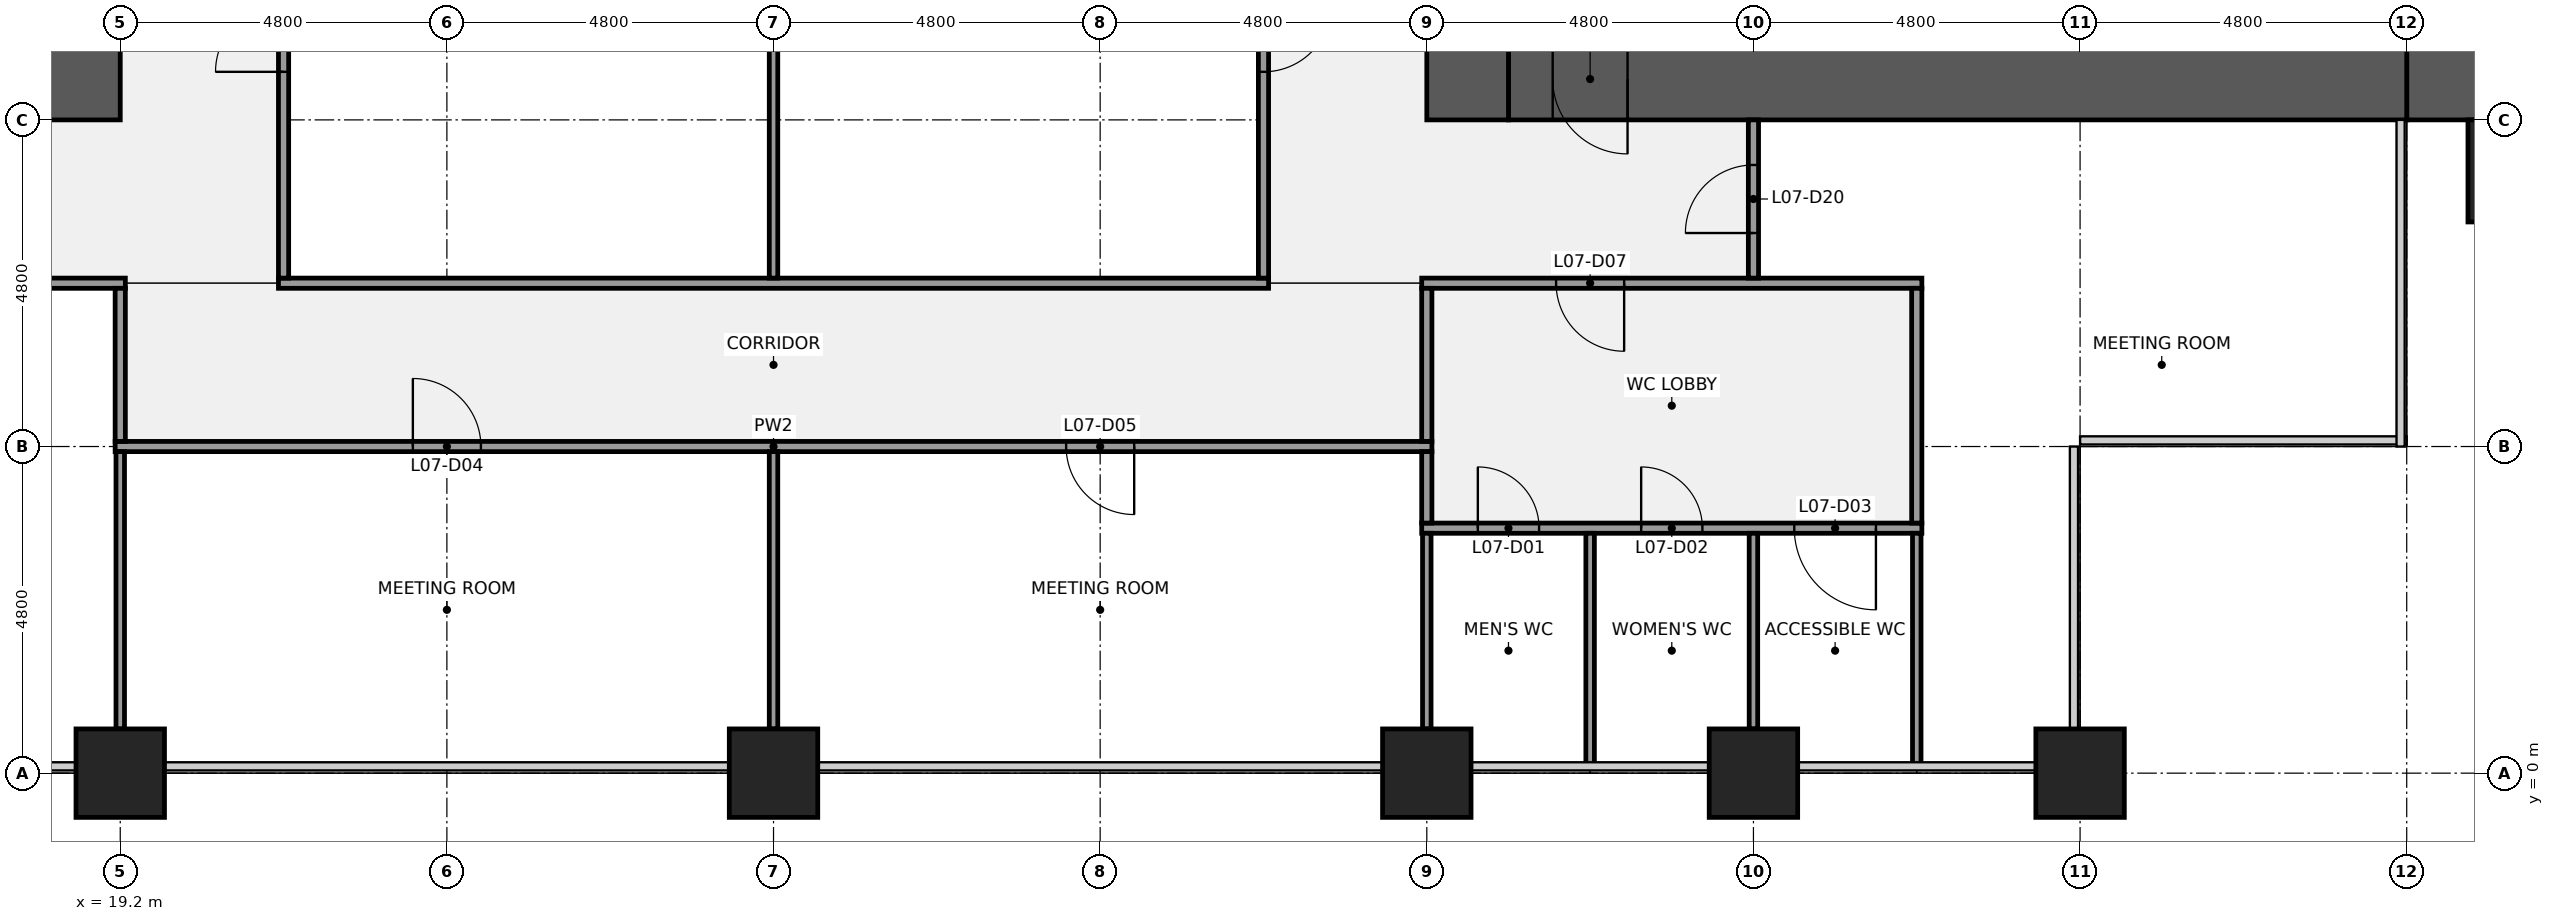
"""IFC4 building model, lengths in metres.
Left out: names, types, materials, properties, quantities, classifications, styles, units other than length and angle.
Written with IfcOpenShell. Run it as: python <this file> out.ifc"""

import sys

from ifc_helpers import new_model, si_unit, direction, frame, frame_2d, origin, origin_2d, place, context, subcontext, project, spatial, rectangle, extrude, element, fill, save


model = new_model("IFC4")
c1 = context("Model", 3, precision=1e-05, world=origin(), true_north=direction((0.0, 1.0)))
c2 = subcontext(c1, "Body", "Model", "MODEL_VIEW")
j1 = project(units=[si_unit("LENGTHUNIT", "METRE"), si_unit("PLANEANGLEUNIT", "RADIAN")], contexts=[c1])
p1 = place(None, origin())
s1 = spatial("IfcSite", under=j1, at=p1, CompositionType="ELEMENT")
p2 = place(p1, origin())
s2 = spatial("IfcBuilding", under=s1, at=p2, CompositionType="ELEMENT")
p3 = place(p2, frame((0.0, 0.0, 39.0)))
s3 = spatial("IfcBuildingStorey", under=s2, at=p3, CompositionType="ELEMENT", Elevation=39.0)
for number, where, z_axis, x_axis in (
    (1, (19.2, 0.0, 0.0), (0.0, 0.0, 1.0), (1.0, 0.0, 0.0)),
    (2, (28.8, 0.0, 0.0), (0.0, 0.0, 1.0), (1.0, 0.0, 0.0)),
    (3, (38.4, 0.0, 0.0), (0.0, 0.0, 1.0), (1.0, 0.0, 0.0)),
    (4, (43.2, 0.0, 0.0), (0.0, 0.0, 1.0), (1.0, 0.0, 0.0)),
    (5, (48.0, 0.0, 0.0), (0.0, 0.0, 1.0), (1.0, 0.0, 0.0)),
):
    element("IfcColumn", number, at=place(p3, frame(where, z_axis=z_axis, x_axis=x_axis)), inside=s3, PredefinedType="COLUMN", context=c2, shape_type="SweptSolid", body=[
        extrude(rectangle(XDim=1.3, YDim=1.3, at=origin_2d()), origin(), (0.0, 0.0, 1.0), 4.0),
    ])
p4 = place(p3, frame((18.6, 38.4, 0.0), z_axis=(0.0, 0.0, 1.0), x_axis=(0.0, -1.0, 0.0)))
e6 = element("IfcWall", 6, at=p4, inside=s3, PredefinedType="SHEAR", context=c2, shape_type="SweptSolid", body=[
    extrude(rectangle(XDim=28.8, YDim=1.2, at=frame_2d((14.4, 0.0))), origin(), (0.0, 0.0, 1.0), 3.84),
])
p5 = place(p4, frame((18.3, 0.0, 0.0)))
e7 = element("IfcOpeningElement", 7, at=p5, cuts=e6, PredefinedType="OPENING", context=c2, shape_type="SweptSolid", body=[
    extrude(rectangle(XDim=1.8, YDim=2.1, at=frame_2d((0.9, 1.05))), frame((0.0, 0.61, 0.0), z_axis=(0.0, -1.0, 0.0), x_axis=(1.0, 0.0, 0.0)), (0.0, 0.0, 1.0), 1.22),
])
p6 = place(p4, frame((8.7, 0.0, 0.0)))
e8 = element("IfcOpeningElement", 8, at=p6, cuts=e6, PredefinedType="OPENING", context=c2, shape_type="SweptSolid", body=[
    extrude(rectangle(XDim=1.8, YDim=2.1, at=frame_2d((0.9, 1.05))), frame((0.0, 0.61, 0.0), z_axis=(0.0, -1.0, 0.0), x_axis=(1.0, 0.0, 0.0)), (0.0, 0.0, 1.0), 1.22),
])
p7 = place(p3, frame((56.4, 10.2, 0.0), z_axis=(0.0, 0.0, 1.0), x_axis=(-1.0, 0.0, 0.0)))
e9 = element("IfcWall", 9, at=p7, inside=s3, PredefinedType="SHEAR", context=c2, shape_type="SweptSolid", body=[
    extrude(rectangle(XDim=3.6, YDim=1.2, at=frame_2d((1.8, 0.0))), origin(), (0.0, 0.0, 1.0), 3.84),
])
p8 = place(p3, frame((52.8, 10.2, 0.0), z_axis=(0.0, 0.0, 1.0), x_axis=(-1.0, 0.0, 0.0)))
e10 = element("IfcWall", 10, at=p8, inside=s3, PredefinedType="SHEAR", context=c2, shape_type="SweptSolid", body=[
    extrude(rectangle(XDim=13.2, YDim=1.2, at=frame_2d((6.6, 0.0))), origin(), (0.0, 0.0, 1.0), 3.84),
])
p9 = place(p8, frame((11.45, 0.0, 0.0)))
e11 = element("IfcOpeningElement", 11, at=p9, cuts=e10, PredefinedType="OPENING", context=c2, shape_type="SweptSolid", body=[
    extrude(rectangle(XDim=1.1, YDim=2.1, at=frame_2d((0.55, 1.05))), frame((0.0, 0.61, 0.0), z_axis=(0.0, -1.0, 0.0), x_axis=(1.0, 0.0, 0.0)), (0.0, 0.0, 1.0), 1.22),
])
p10 = place(p3, frame((39.0, 9.6, 0.0), z_axis=(0.0, 0.0, 1.0), x_axis=(0.0, 1.0, 0.0)))
e12 = element("IfcWall", 12, at=p10, inside=s3, PredefinedType="SHEAR", context=c2, shape_type="SweptSolid", body=[
    extrude(rectangle(XDim=28.8, YDim=1.2, at=frame_2d((14.4, 0.0))), origin(), (0.0, 0.0, 1.0), 3.84),
])
p11 = place(p10, frame((8.7, 0.0, 0.0)))
e13 = element("IfcOpeningElement", 13, at=p11, cuts=e12, PredefinedType="OPENING", context=c2, shape_type="SweptSolid", body=[
    extrude(rectangle(XDim=1.8, YDim=2.1, at=frame_2d((0.9, 1.05))), frame((0.0, 0.61, 0.0), z_axis=(0.0, -1.0, 0.0), x_axis=(1.0, 0.0, 0.0)), (0.0, 0.0, 1.0), 1.22),
])
p12 = place(p10, frame((18.3, 0.0, 0.0)))
e14 = element("IfcOpeningElement", 14, at=p12, cuts=e12, PredefinedType="OPENING", context=c2, shape_type="SweptSolid", body=[
    extrude(rectangle(XDim=1.8, YDim=2.1, at=frame_2d((0.9, 1.05))), frame((0.0, 0.61, 0.0), z_axis=(0.0, -1.0, 0.0), x_axis=(1.0, 0.0, 0.0)), (0.0, 0.0, 1.0), 1.22),
])
p13 = place(p3, frame((38.325, 3.6, 0.0), z_axis=(0.0, 0.0, 1.0), x_axis=(1.0, 0.0, 0.0)))
e15 = element("IfcWall", 15, at=p13, inside=s3, PredefinedType="PARTITIONING", context=c2, shape_type="SweptSolid", body=[
    extrude(rectangle(XDim=7.35, YDim=0.15, at=frame_2d((3.675, 0.0))), origin(), (0.0, 0.0, 1.0), 2.87),
])
p14 = place(p13, frame((0.825, 0.0, 0.0)))
e16 = element("IfcOpeningElement", 16, at=p14, cuts=e15, PredefinedType="OPENING", context=c2, shape_type="SweptSolid", body=[
    extrude(rectangle(XDim=0.9, YDim=2.1, at=frame_2d((0.45, 1.05))), frame((0.0, 0.085, 0.0), z_axis=(0.0, -1.0, 0.0), x_axis=(1.0, 0.0, 0.0)), (0.0, 0.0, 1.0), 0.17),
])
p15 = place(p13, frame((3.225, 0.0, 0.0)))
e17 = element("IfcOpeningElement", 17, at=p15, cuts=e15, PredefinedType="OPENING", context=c2, shape_type="SweptSolid", body=[
    extrude(rectangle(XDim=0.9, YDim=2.1, at=frame_2d((0.45, 1.05))), frame((0.0, 0.085, 0.0), z_axis=(0.0, -1.0, 0.0), x_axis=(1.0, 0.0, 0.0)), (0.0, 0.0, 1.0), 0.17),
])
p16 = place(p13, frame((5.475, 0.0, 0.0)))
e18 = element("IfcOpeningElement", 18, at=p16, cuts=e15, PredefinedType="OPENING", context=c2, shape_type="SweptSolid", body=[
    extrude(rectangle(XDim=1.2, YDim=2.1, at=frame_2d((0.6, 1.05))), frame((0.0, 0.085, 0.0), z_axis=(0.0, -1.0, 0.0), x_axis=(1.0, 0.0, 0.0)), (0.0, 0.0, 1.0), 0.17),
])
p17 = place(p3, frame((19.125, 4.8, 0.0), z_axis=(0.0, 0.0, 1.0), x_axis=(1.0, 0.0, 0.0)))
e19 = element("IfcWall", 19, at=p17, inside=s3, PredefinedType="PARTITIONING", context=c2, shape_type="SweptSolid", body=[
    extrude(rectangle(XDim=19.35, YDim=0.15, at=frame_2d((9.675, 0.0))), origin(), (0.0, 0.0, 1.0), 2.87),
])
p18 = place(p17, frame((4.375, 0.0, 0.0)))
e20 = element("IfcOpeningElement", 20, at=p18, cuts=e19, PredefinedType="OPENING", context=c2, shape_type="SweptSolid", body=[
    extrude(rectangle(XDim=1.0, YDim=2.1, at=frame_2d((0.5, 1.05))), frame((0.0, 0.085, 0.0), z_axis=(0.0, -1.0, 0.0), x_axis=(1.0, 0.0, 0.0)), (0.0, 0.0, 1.0), 0.17),
])
p19 = place(p17, frame((13.975, 0.0, 0.0)))
e21 = element("IfcOpeningElement", 21, at=p19, cuts=e19, PredefinedType="OPENING", context=c2, shape_type="SweptSolid", body=[
    extrude(rectangle(XDim=1.0, YDim=2.1, at=frame_2d((0.5, 1.05))), frame((0.0, 0.085, 0.0), z_axis=(0.0, -1.0, 0.0), x_axis=(1.0, 0.0, 0.0)), (0.0, 0.0, 1.0), 0.17),
])
p20 = place(p3, frame((14.325, 7.2, 0.0), z_axis=(0.0, 0.0, 1.0), x_axis=(1.0, 0.0, 0.0)))
e22 = element("IfcWall", 22, at=p20, inside=s3, PredefinedType="PARTITIONING", context=c2, shape_type="SweptSolid", body=[
    extrude(rectangle(XDim=4.95, YDim=0.15, at=frame_2d((2.475, 0.0))), origin(), (0.0, 0.0, 1.0), 2.87),
])
p21 = place(p20, frame((1.975, 0.0, 0.0)))
e23 = element("IfcOpeningElement", 23, at=p21, cuts=e22, PredefinedType="OPENING", context=c2, shape_type="SweptSolid", body=[
    extrude(rectangle(XDim=1.0, YDim=2.1, at=frame_2d((0.5, 1.05))), frame((0.0, 0.085, 0.0), z_axis=(0.0, -1.0, 0.0), x_axis=(1.0, 0.0, 0.0)), (0.0, 0.0, 1.0), 0.17),
])
p22 = place(p3, frame((21.525, 7.2, 0.0), z_axis=(0.0, 0.0, 1.0), x_axis=(1.0, 0.0, 0.0)))
e24 = element("IfcWall", 24, at=p22, inside=s3, PredefinedType="PARTITIONING", context=c2, shape_type="SweptSolid", body=[
    extrude(rectangle(XDim=14.55, YDim=0.15, at=frame_2d((7.275, 0.0))), origin(), (0.0, 0.0, 1.0), 2.87),
])
p23 = place(p3, frame((38.325, 7.2, 0.0), z_axis=(0.0, 0.0, 1.0), x_axis=(1.0, 0.0, 0.0)))
e25 = element("IfcWall", 25, at=p23, inside=s3, PredefinedType="PARTITIONING", context=c2, shape_type="SweptSolid", body=[
    extrude(rectangle(XDim=7.35, YDim=0.15, at=frame_2d((3.675, 0.0))), origin(), (0.0, 0.0, 1.0), 2.87),
])
p24 = place(p23, frame((1.975, 0.0, 0.0)))
e26 = element("IfcOpeningElement", 26, at=p24, cuts=e25, PredefinedType="OPENING", context=c2, shape_type="SweptSolid", body=[
    extrude(rectangle(XDim=1.0, YDim=2.1, at=frame_2d((0.5, 1.05))), frame((0.0, 0.085, 0.0), z_axis=(0.0, -1.0, 0.0), x_axis=(1.0, 0.0, 0.0)), (0.0, 0.0, 1.0), 0.17),
])
p25 = place(p3, frame((19.2, 0.65, 0.0), z_axis=(0.0, 0.0, 1.0), x_axis=(0.0, 1.0, 0.0)))
e27 = element("IfcWall", 27, at=p25, inside=s3, PredefinedType="PARTITIONING", context=c2, shape_type="SweptSolid", body=[
    extrude(rectangle(XDim=4.075, YDim=0.125, at=frame_2d((2.038, 0.0))), origin(), (0.0, 0.0, 1.0), 2.87),
])
p26 = place(p3, frame((19.2, 4.875, 0.0), z_axis=(0.0, 0.0, 1.0), x_axis=(0.0, 1.0, 0.0)))
e28 = element("IfcWall", 28, at=p26, inside=s3, PredefinedType="PARTITIONING", context=c2, shape_type="SweptSolid", body=[
    extrude(rectangle(XDim=2.25, YDim=0.15, at=frame_2d((1.125, 0.0))), origin(), (0.0, 0.0, 1.0), 2.87),
])
p27 = place(p3, frame((21.6, 7.275, 0.0), z_axis=(0.0, 0.0, 1.0), x_axis=(0.0, 1.0, 0.0)))
e29 = element("IfcWall", 29, at=p27, inside=s3, PredefinedType="PARTITIONING", context=c2, shape_type="SweptSolid", body=[
    extrude(rectangle(XDim=7.062, YDim=0.15, at=frame_2d((3.531, 0.0))), origin(), (0.0, 0.0, 1.0), 2.87),
])
p28 = place(p27, frame((3.031, 0.0, 0.0)))
e30 = element("IfcOpeningElement", 30, at=p28, cuts=e29, PredefinedType="OPENING", context=c2, shape_type="SweptSolid", body=[
    extrude(rectangle(XDim=1.0, YDim=2.1, at=frame_2d((0.5, 1.05))), frame((0.0, 0.085, 0.0), z_axis=(0.0, -1.0, 0.0), x_axis=(1.0, 0.0, 0.0)), (0.0, 0.0, 1.0), 0.17),
])
p29 = place(p3, frame((28.8, 0.65, 0.0), z_axis=(0.0, 0.0, 1.0), x_axis=(0.0, 1.0, 0.0)))
e31 = element("IfcWall", 31, at=p29, inside=s3, PredefinedType="PARTITIONING", context=c2, shape_type="SweptSolid", body=[
    extrude(rectangle(XDim=4.075, YDim=0.125, at=frame_2d((2.038, 0.0))), origin(), (0.0, 0.0, 1.0), 2.87),
])
p30 = place(p3, frame((28.8, 7.275, 0.0), z_axis=(0.0, 0.0, 1.0), x_axis=(0.0, 1.0, 0.0)))
e32 = element("IfcWall", 32, at=p30, inside=s3, PredefinedType="PARTITIONING", context=c2, shape_type="SweptSolid", body=[
    extrude(rectangle(XDim=7.062, YDim=0.125, at=frame_2d((3.531, 0.0))), origin(), (0.0, 0.0, 1.0), 2.87),
])
p31 = place(p3, frame((36.0, 7.275, 0.0), z_axis=(0.0, 0.0, 1.0), x_axis=(0.0, 1.0, 0.0)))
e33 = element("IfcWall", 33, at=p31, inside=s3, PredefinedType="PARTITIONING", context=c2, shape_type="SweptSolid", body=[
    extrude(rectangle(XDim=7.062, YDim=0.15, at=frame_2d((3.531, 0.0))), origin(), (0.0, 0.0, 1.0), 2.87),
])
p32 = place(p31, frame((3.031, 0.0, 0.0)))
e34 = element("IfcOpeningElement", 34, at=p32, cuts=e33, PredefinedType="OPENING", context=c2, shape_type="SweptSolid", body=[
    extrude(rectangle(XDim=1.0, YDim=2.1, at=frame_2d((0.5, 1.05))), frame((0.0, 0.085, 0.0), z_axis=(0.0, -1.0, 0.0), x_axis=(1.0, 0.0, 0.0)), (0.0, 0.0, 1.0), 0.17),
])
p33 = place(p3, frame((38.4, 0.65, 0.0), z_axis=(0.0, 0.0, 1.0), x_axis=(0.0, 1.0, 0.0)))
e35 = element("IfcWall", 35, at=p33, inside=s3, PredefinedType="PARTITIONING", context=c2, shape_type="SweptSolid", body=[
    extrude(rectangle(XDim=2.875, YDim=0.125, at=frame_2d((1.438, 0.0))), origin(), (0.0, 0.0, 1.0), 2.87),
])
p34 = place(p3, frame((38.4, 3.675, 0.0), z_axis=(0.0, 0.0, 1.0), x_axis=(0.0, 1.0, 0.0)))
e36 = element("IfcWall", 36, at=p34, inside=s3, PredefinedType="PARTITIONING", context=c2, shape_type="SweptSolid", body=[
    extrude(rectangle(XDim=1.05, YDim=0.15, at=frame_2d((0.525, 0.0))), origin(), (0.0, 0.0, 1.0), 2.87),
])
p35 = place(p3, frame((38.4, 4.875, 0.0), z_axis=(0.0, 0.0, 1.0), x_axis=(0.0, 1.0, 0.0)))
e37 = element("IfcWall", 37, at=p35, inside=s3, PredefinedType="PARTITIONING", context=c2, shape_type="SweptSolid", body=[
    extrude(rectangle(XDim=2.25, YDim=0.15, at=frame_2d((1.125, 0.0))), origin(), (0.0, 0.0, 1.0), 2.87),
])
p36 = place(p3, frame((40.8, 0.1, 0.0), z_axis=(0.0, 0.0, 1.0), x_axis=(0.0, 1.0, 0.0)))
e38 = element("IfcWall", 38, at=p36, inside=s3, PredefinedType="PARTITIONING", context=c2, shape_type="SweptSolid", body=[
    extrude(rectangle(XDim=3.425, YDim=0.125, at=frame_2d((1.712, 0.0))), origin(), (0.0, 0.0, 1.0), 2.87),
])
p37 = place(p3, frame((43.2, 0.65, 0.0), z_axis=(0.0, 0.0, 1.0), x_axis=(0.0, 1.0, 0.0)))
e39 = element("IfcWall", 39, at=p37, inside=s3, PredefinedType="PARTITIONING", context=c2, shape_type="SweptSolid", body=[
    extrude(rectangle(XDim=2.875, YDim=0.125, at=frame_2d((1.438, 0.0))), origin(), (0.0, 0.0, 1.0), 2.87),
])
p38 = place(p3, frame((43.2, 7.275, 0.0), z_axis=(0.0, 0.0, 1.0), x_axis=(0.0, 1.0, 0.0)))
e40 = element("IfcWall", 40, at=p38, inside=s3, PredefinedType="PARTITIONING", context=c2, shape_type="SweptSolid", body=[
    extrude(rectangle(XDim=2.325, YDim=0.15, at=frame_2d((1.163, 0.0))), origin(), (0.0, 0.0, 1.0), 2.87),
])
p39 = place(p38, frame((0.663, 0.0, 0.0)))
e41 = element("IfcOpeningElement", 41, at=p39, cuts=e40, PredefinedType="OPENING", context=c2, shape_type="SweptSolid", body=[
    extrude(rectangle(XDim=1.0, YDim=2.1, at=frame_2d((0.5, 1.05))), frame((0.0, 0.085, 0.0), z_axis=(0.0, -1.0, 0.0), x_axis=(1.0, 0.0, 0.0)), (0.0, 0.0, 1.0), 0.17),
])
p40 = place(p3, frame((45.6, 0.1, 0.0), z_axis=(0.0, 0.0, 1.0), x_axis=(0.0, 1.0, 0.0)))
e42 = element("IfcWall", 42, at=p40, inside=s3, PredefinedType="PARTITIONING", context=c2, shape_type="SweptSolid", body=[
    extrude(rectangle(XDim=3.425, YDim=0.125, at=frame_2d((1.712, 0.0))), origin(), (0.0, 0.0, 1.0), 2.87),
])
p41 = place(p3, frame((45.6, 3.675, 0.0), z_axis=(0.0, 0.0, 1.0), x_axis=(0.0, 1.0, 0.0)))
e43 = element("IfcWall", 43, at=p41, inside=s3, PredefinedType="PARTITIONING", context=c2, shape_type="SweptSolid", body=[
    extrude(rectangle(XDim=3.45, YDim=0.15, at=frame_2d((1.725, 0.0))), origin(), (0.0, 0.0, 1.0), 2.87),
])
p42 = place(p3, frame((55.2, 8.85, 0.0), z_axis=(0.0, 0.0, 1.0), x_axis=(1.0, 0.0, 0.0)))
e44 = element("IfcColumn", 44, at=p42, inside=s3, PredefinedType="PILASTER", context=c2, shape_type="SweptSolid", body=[
    extrude(rectangle(XDim=3.0, YDim=1.5, at=origin_2d()), origin(), (0.0, 0.0, 1.0), 4.0),
])
for number, where, z_axis, x_axis in (
    (45, (19.2, -1.075, 0.0), (0.0, 0.0, 1.0), (1.0, 0.0, 0.0)),
    (46, (38.4, -1.075, 0.0), (0.0, 0.0, 1.0), (1.0, 0.0, 0.0)),
    (47, (43.2, -1.075, 0.0), (0.0, 0.0, 1.0), (1.0, 0.0, 0.0)),
    (48, (48.0, -1.075, 0.0), (0.0, 0.0, 1.0), (1.0, 0.0, 0.0)),
):
    element("IfcColumn", number, at=place(p3, frame(where, z_axis=z_axis, x_axis=x_axis)), inside=s3, PredefinedType="PILASTER", context=c2, shape_type="SweptSolid", body=[
        extrude(rectangle(XDim=4.2, YDim=0.85, at=origin_2d()), origin(), (0.0, 0.0, 1.0), 4.0),
    ])
p43 = place(p9, origin())
e49 = element("IfcDoor", 49, at=p43, inside=s3, OperationType="SINGLE_SWING_LEFT", PredefinedType="DOOR", context=c2, shape_type="SweptSolid", body=[
    extrude(rectangle(XDim=1.1, YDim=2.1, at=frame_2d((0.55, 1.05))), frame((0.0, 0.025, 0.0), z_axis=(0.0, -1.0, 0.0), x_axis=(1.0, 0.0, 0.0)), (0.0, 0.0, 1.0), 0.05),
])
fill(e11, e49)
p44 = place(p14, origin())
e50 = element("IfcDoor", 50, at=p44, inside=s3, OperationType="SINGLE_SWING_LEFT", PredefinedType="DOOR", context=c2, shape_type="SweptSolid", body=[
    extrude(rectangle(XDim=0.9, YDim=2.1, at=frame_2d((0.45, 1.05))), frame((0.0, 0.025, 0.0), z_axis=(0.0, -1.0, 0.0), x_axis=(1.0, 0.0, 0.0)), (0.0, 0.0, 1.0), 0.05),
])
fill(e16, e50)
p45 = place(p15, origin())
e51 = element("IfcDoor", 51, at=p45, inside=s3, OperationType="SINGLE_SWING_LEFT", PredefinedType="DOOR", context=c2, shape_type="SweptSolid", body=[
    extrude(rectangle(XDim=0.9, YDim=2.1, at=frame_2d((0.45, 1.05))), frame((0.0, 0.025, 0.0), z_axis=(0.0, -1.0, 0.0), x_axis=(1.0, 0.0, 0.0)), (0.0, 0.0, 1.0), 0.05),
])
fill(e17, e51)
p46 = place(p16, origin())
e52 = element("IfcDoor", 52, at=p46, inside=s3, OperationType="SINGLE_SWING_RIGHT", PredefinedType="DOOR", context=c2, shape_type="SweptSolid", body=[
    extrude(rectangle(XDim=1.2, YDim=2.1, at=frame_2d((0.6, 1.05))), frame((0.0, 0.025, 0.0), z_axis=(0.0, -1.0, 0.0), x_axis=(1.0, 0.0, 0.0)), (0.0, 0.0, 1.0), 0.05),
])
fill(e18, e52)
p47 = place(p18, origin())
e53 = element("IfcDoor", 53, at=p47, inside=s3, OperationType="SINGLE_SWING_LEFT", PredefinedType="DOOR", context=c2, shape_type="SweptSolid", body=[
    extrude(rectangle(XDim=1.0, YDim=2.1, at=frame_2d((0.5, 1.05))), frame((0.0, 0.025, 0.0), z_axis=(0.0, -1.0, 0.0), x_axis=(1.0, 0.0, 0.0)), (0.0, 0.0, 1.0), 0.05),
])
fill(e20, e53)
p48 = place(p19, origin())
e54 = element("IfcDoor", 54, at=p48, inside=s3, OperationType="SINGLE_SWING_RIGHT", PredefinedType="DOOR", context=c2, shape_type="SweptSolid", body=[
    extrude(rectangle(XDim=1.0, YDim=2.1, at=frame_2d((0.5, 1.05))), frame((0.0, 0.025, 0.0), z_axis=(0.0, -1.0, 0.0), x_axis=(1.0, 0.0, 0.0)), (0.0, 0.0, 1.0), 0.05),
])
fill(e21, e54)
p49 = place(p24, origin())
e55 = element("IfcDoor", 55, at=p49, inside=s3, OperationType="SINGLE_SWING_RIGHT", PredefinedType="DOOR", context=c2, shape_type="SweptSolid", body=[
    extrude(rectangle(XDim=1.0, YDim=2.1, at=frame_2d((0.5, 1.05))), frame((0.0, 0.025, 0.0), z_axis=(0.0, -1.0, 0.0), x_axis=(1.0, 0.0, 0.0)), (0.0, 0.0, 1.0), 0.05),
])
fill(e26, e55)
p50 = place(p28, origin())
e56 = element("IfcDoor", 56, at=p50, inside=s3, OperationType="SINGLE_SWING_LEFT", PredefinedType="DOOR", context=c2, shape_type="SweptSolid", body=[
    extrude(rectangle(XDim=1.0, YDim=2.1, at=frame_2d((0.5, 1.05))), frame((0.0, 0.025, 0.0), z_axis=(0.0, -1.0, 0.0), x_axis=(1.0, 0.0, 0.0)), (0.0, 0.0, 1.0), 0.05),
])
fill(e30, e56)
p51 = place(p32, origin())
e57 = element("IfcDoor", 57, at=p51, inside=s3, OperationType="SINGLE_SWING_RIGHT", PredefinedType="DOOR", context=c2, shape_type="SweptSolid", body=[
    extrude(rectangle(XDim=1.0, YDim=2.1, at=frame_2d((0.5, 1.05))), frame((0.0, 0.025, 0.0), z_axis=(0.0, -1.0, 0.0), x_axis=(1.0, 0.0, 0.0)), (0.0, 0.0, 1.0), 0.05),
])
fill(e34, e57)
p52 = place(p39, origin())
e58 = element("IfcDoor", 58, at=p52, inside=s3, OperationType="SINGLE_SWING_LEFT", PredefinedType="DOOR", context=c2, shape_type="SweptSolid", body=[
    extrude(rectangle(XDim=1.0, YDim=2.1, at=frame_2d((0.5, 1.05))), frame((0.0, 0.025, 0.0), z_axis=(0.0, -1.0, 0.0), x_axis=(1.0, 0.0, 0.0)), (0.0, 0.0, 1.0), 0.05),
])
fill(e41, e58)
save(model, sys.argv[1])
